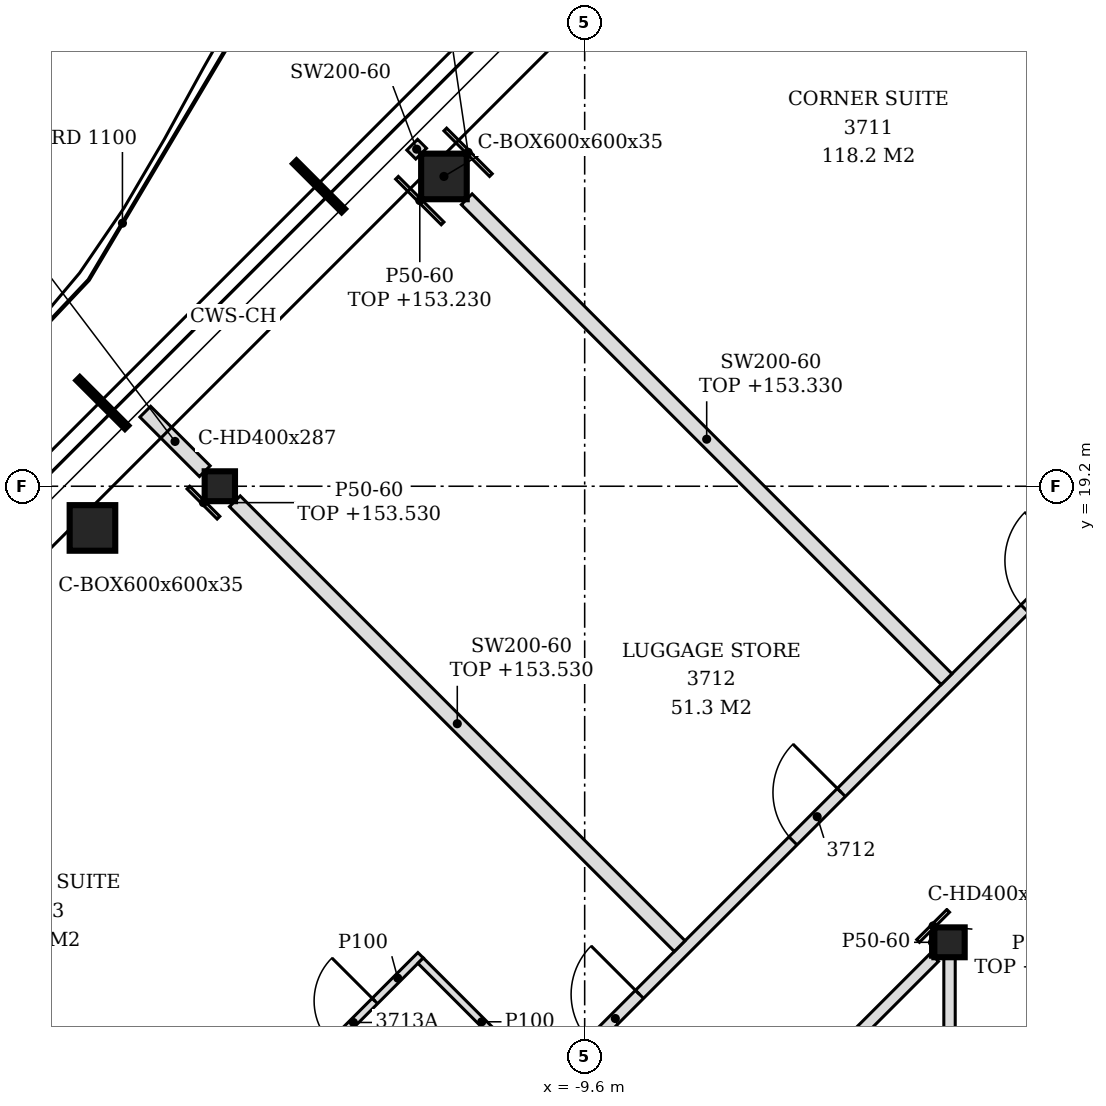
"""IFC4 building model, lengths in metres.
Left out: names, types, materials, properties, quantities, classifications, styles, units other than length and angle.
Written with IfcOpenShell. Run it as: python <this file> out.ifc"""

import sys

from ifc_helpers import new_model, si_unit, direction, frame, frame_2d, origin, origin_2d, place, context, subcontext, project, spatial, rectangle, hollow_rectangle, i_section, extrude, element, fill, save


model = new_model("IFC4")
c1 = context("Model", 3, precision=1e-05, world=origin(), true_north=direction((0.0, 1.0)))
c2 = subcontext(c1, "Body", "Model", "MODEL_VIEW")
j1 = project(units=[si_unit("LENGTHUNIT", "METRE"), si_unit("PLANEANGLEUNIT", "RADIAN")], contexts=[c1])
p1 = place(None, origin())
s1 = spatial("IfcSite", under=j1, at=p1, CompositionType="ELEMENT")
p2 = place(p1, origin())
s2 = spatial("IfcBuilding", under=s1, at=p2, CompositionType="ELEMENT")
p3 = place(p2, frame((0.0, 0.0, 150.6)))
s3 = spatial("IfcBuildingStorey", under=s2, at=p3, CompositionType="ELEMENT", Elevation=150.6)
for number, where, z_axis, x_axis in (
    (1, (-11.451, 23.276, -0.15), (0.0, 0.0, 1.0), (1.0, 0.0, 0.0)),
    (2, (-16.076, 18.652, -0.15), (0.0, 0.0, 1.0), (1.0, 0.0, 0.0)),
):
    element("IfcColumn", number, at=place(p3, frame(where, z_axis=z_axis, x_axis=x_axis)), inside=s3, PredefinedType="COLUMN", context=c2, shape_type="SweptSolid", body=[
        extrude(hollow_rectangle(XDim=0.6, YDim=0.6, WallThickness=0.035, at=origin_2d()), origin(), (0.0, 0.0, 1.0), 3.6),
    ])
for number, where, z_axis, x_axis in (
    (3, (-4.8, 13.2, -0.15), (0.0, 0.0, 1.0), (1.0, 0.0, 0.0)),
    (4, (-14.4, 19.2, -0.15), (0.0, 0.0, 1.0), (1.0, 0.0, 0.0)),
):
    element("IfcColumn", number, at=place(p3, frame(where, z_axis=z_axis, x_axis=x_axis)), inside=s3, PredefinedType="COLUMN", context=c2, shape_type="SweptSolid", body=[
        extrude(i_section(OverallWidth=0.399, OverallDepth=0.393, WebThickness=0.023, FlangeThickness=0.037, FilletRadius=0.015, at=origin_2d()), origin(), (0.0, 0.0, 1.0), 3.6),
    ])
p4 = place(p3, frame((-4.8, 2.596, 0.0), z_axis=(0.0, 0.0, 1.0), x_axis=(0.0, 1.0, 0.0)))
e5 = element("IfcWall", 5, at=p4, inside=s3, PredefinedType="PARTITIONING", context=c2, shape_type="SweptSolid", body=[
    extrude(rectangle(XDim=10.407, YDim=0.15, at=frame_2d((5.204, 0.0))), origin(), (0.0, 0.0, 1.0), 2.83),
])
p5 = place(p4, frame((2.954, 0.0, 0.0)))
e6 = element("IfcOpeningElement", 6, at=p5, cuts=e5, PredefinedType="OPENING", context=c2, shape_type="SweptSolid", body=[
    extrude(rectangle(XDim=0.9, YDim=2.1, at=frame_2d((0.45, 1.05))), frame((0.0, 0.085, 0.0), z_axis=(0.0, -1.0, 0.0), x_axis=(1.0, 0.0, 0.0)), (0.0, 0.0, 1.0), 0.17),
])
p6 = place(p3, frame((-9.675, 8.325, 0.0), z_axis=(0.0, 0.0, 1.0), x_axis=(0.707106781187, 0.707106781187, 0.0)))
e7 = element("IfcWall", 7, at=p6, inside=s3, PredefinedType="PARTITIONING", context=c2, shape_type="SweptSolid", body=[
    extrude(rectangle(XDim=6.614, YDim=0.15, at=frame_2d((3.307, 0.0))), origin(), (0.0, 0.0, 1.0), 2.93),
])
p7 = place(p3, frame((-12.075, 9.319, 0.0), z_axis=(0.0, 0.0, 1.0), x_axis=(0.707106781187, 0.707106781187, 0.0)))
e8 = element("IfcWall", 8, at=p7, inside=s3, PredefinedType="PARTITIONING", context=c2, shape_type="SweptSolid", body=[
    extrude(rectangle(XDim=13.793, YDim=0.15, at=frame_2d((6.896, 0.0))), origin(), (0.0, 0.0, 1.0), 2.73),
])
p8 = place(p7, frame((11.692, 0.0, 0.0)))
e9 = element("IfcOpeningElement", 9, at=p8, cuts=e8, PredefinedType="OPENING", context=c2, shape_type="SweptSolid", body=[
    extrude(rectangle(XDim=0.9, YDim=2.1, at=frame_2d((0.45, 1.05))), frame((0.0, 0.085, 0.0), z_axis=(0.0, -1.0, 0.0), x_axis=(1.0, 0.0, 0.0)), (0.0, 0.0, 1.0), 0.17),
])
p9 = place(p7, frame((7.376, 0.0, 0.0)))
e10 = element("IfcOpeningElement", 10, at=p9, cuts=e8, PredefinedType="OPENING", context=c2, shape_type="SweptSolid", body=[
    extrude(rectangle(XDim=0.9, YDim=2.1, at=frame_2d((0.45, 1.05))), frame((0.0, 0.085, 0.0), z_axis=(0.0, -1.0, 0.0), x_axis=(1.0, 0.0, 0.0)), (0.0, 0.0, 1.0), 0.17),
])
p10 = place(p7, frame((3.62, 0.0, 0.0)))
e11 = element("IfcOpeningElement", 11, at=p10, cuts=e8, PredefinedType="OPENING", context=c2, shape_type="SweptSolid", body=[
    extrude(rectangle(XDim=0.9, YDim=2.1, at=frame_2d((0.45, 1.05))), frame((0.0, 0.085, 0.0), z_axis=(0.0, -1.0, 0.0), x_axis=(1.0, 0.0, 0.0)), (0.0, 0.0, 1.0), 0.17),
])
p11 = place(p3, frame((-13.526, 11.262, 0.0), z_axis=(0.0, 0.0, 1.0), x_axis=(0.707106781187, 0.707106781187, 0.0)))
e12 = element("IfcWall", 12, at=p11, inside=s3, PredefinedType="PARTITIONING", context=c2, shape_type="SweptSolid", body=[
    extrude(rectangle(XDim=2.5, YDim=0.1, at=frame_2d((1.25, 0.0))), origin(), (0.0, 0.0, 1.0), 3.45),
])
p12 = place(p11, frame((0.85, 0.0, 0.0)))
e13 = element("IfcOpeningElement", 13, at=p12, cuts=e12, PredefinedType="OPENING", context=c2, shape_type="SweptSolid", body=[
    extrude(rectangle(XDim=0.8, YDim=2.1, at=frame_2d((0.4, 1.05))), frame((0.0, 0.06, 0.0), z_axis=(0.0, -1.0, 0.0), x_axis=(1.0, 0.0, 0.0)), (0.0, 0.0, 1.0), 0.12),
])
p13 = place(p3, frame((-10.15, 11.35, 0.0), z_axis=(0.0, 0.0, 1.0), x_axis=(-0.707160441348, 0.707053116953, 0.0)))
e14 = element("IfcWall", 14, at=p13, inside=s3, PredefinedType="PARTITIONING", context=c2, shape_type="SweptSolid", body=[
    extrude(rectangle(XDim=2.275, YDim=0.1, at=frame_2d((1.137, 0.0))), origin(), (0.0, 0.0, 1.0), 3.45),
])
p14 = place(p3, frame((-8.35, 13.15, 0.0), z_axis=(0.0, 0.0, 1.0), x_axis=(-0.707092030896, 0.707121531169, 0.0)))
e15 = element("IfcWall", 15, at=p14, inside=s3, PredefinedType="PARTITIONING", context=c2, shape_type="SweptSolid", body=[
    extrude(rectangle(XDim=8.276, YDim=0.2, at=frame_2d((4.138, 0.0))), origin(), (0.0, 0.0, 1.0), 2.93),
])
p15 = place(p3, frame((-4.838, 16.662, 0.0), z_axis=(0.0, 0.0, 1.0), x_axis=(-0.707120452615, 0.707093109494, 0.0)))
e16 = element("IfcWall", 16, at=p15, inside=s3, PredefinedType="PARTITIONING", context=c2, shape_type="SweptSolid", body=[
    extrude(rectangle(XDim=8.929, YDim=0.2, at=frame_2d((4.464, 0.0))), origin(), (0.0, 0.0, 1.0), 2.73),
])
p16 = place(p3, frame((-14.598, 19.398, 0.0), z_axis=(0.0, 0.0, 1.0), x_axis=(-0.707106781187, 0.707106781187, 0.0)))
e17 = element("IfcWall", 17, at=p16, inside=s3, PredefinedType="PARTITIONING", context=c2, shape_type="SweptSolid", body=[
    extrude(rectangle(XDim=1.107, YDim=0.2, at=frame_2d((0.554, 0.0))), origin(), (0.0, 0.0, 1.0), 2.63),
])
p17 = place(p3, frame((-11.752, 23.576, 0.0), z_axis=(0.0, 0.0, 1.0), x_axis=(-0.707106781187, 0.707106781187, 0.0)))
e18 = element("IfcWall", 18, at=p17, inside=s3, PredefinedType="PARTITIONING", context=c2, shape_type="SweptSolid", body=[
    extrude(rectangle(XDim=0.166, YDim=0.2, at=frame_2d((0.083, 0.0))), origin(), (0.0, 0.0, 1.0), 3.45),
])
p18 = place(p3, frame((-5.024, 13.003, 0.0), z_axis=(0.0, 0.0, 1.0), x_axis=(0.0, 1.0, 0.0)))
e19 = element("IfcWall", 19, at=p18, inside=s3, PredefinedType="PARTITIONING", context=c2, shape_type="SweptSolid", body=[
    extrude(rectangle(XDim=0.393, YDim=0.05, at=frame_2d((0.197, 0.0))), origin(), (0.0, 0.0, 1.0), 3.45),
])
p19 = place(p3, frame((-5.214, 13.218, 0.0), z_axis=(0.0, 0.0, 1.0), x_axis=(0.707106781187, 0.707106781187, 0.0)))
e20 = element("IfcWall", 20, at=p19, inside=s3, PredefinedType="PARTITIONING", context=c2, shape_type="SweptSolid", body=[
    extrude(rectangle(XDim=0.56, YDim=0.05, at=frame_2d((0.28, 0.0))), origin(), (0.0, 0.0, 1.0), 2.73),
])
p20 = place(p3, frame((-14.418, 18.786, 0.0), z_axis=(0.0, 0.0, 1.0), x_axis=(-0.707106781187, 0.707106781187, 0.0)))
e21 = element("IfcWall", 21, at=p20, inside=s3, PredefinedType="PARTITIONING", context=c2, shape_type="SweptSolid", body=[
    extrude(rectangle(XDim=0.56, YDim=0.05, at=frame_2d((0.28, 0.0))), origin(), (0.0, 0.0, 1.0), 2.93),
])
p21 = place(p3, frame((-11.469, 22.658, 0.0), z_axis=(0.0, 0.0, 1.0), x_axis=(-0.706962899457, 0.707250633645, 0.0)))
e22 = element("IfcWall", 22, at=p21, inside=s3, PredefinedType="PARTITIONING", context=c2, shape_type="SweptSolid", body=[
    extrude(rectangle(XDim=0.848, YDim=0.05, at=frame_2d((0.424, 0.0))), origin(), (0.0, 0.0, 1.0), 2.63),
])
p22 = place(p3, frame((-10.834, 23.293, 0.0), z_axis=(0.0, 0.0, 1.0), x_axis=(-0.707250633645, 0.706962899457, 0.0)))
e23 = element("IfcWall", 23, at=p22, inside=s3, PredefinedType="PARTITIONING", context=c2, shape_type="SweptSolid", body=[
    extrude(rectangle(XDim=0.848, YDim=0.05, at=frame_2d((0.424, 0.0))), origin(), (0.0, 0.0, 1.0), 2.93),
])
p23 = place(p8, origin())
e24 = element("IfcDoor", 24, at=p23, inside=s3, OperationType="SINGLE_SWING_RIGHT", PredefinedType="DOOR", context=c2, shape_type="SweptSolid", body=[
    extrude(rectangle(XDim=0.9, YDim=2.1, at=frame_2d((0.45, 1.05))), frame((0.0, 0.025, 0.0), z_axis=(0.0, -1.0, 0.0), x_axis=(1.0, 0.0, 0.0)), (0.0, 0.0, 1.0), 0.05),
])
fill(e9, e24)
p24 = place(p9, origin())
e25 = element("IfcDoor", 25, at=p24, inside=s3, OperationType="SINGLE_SWING_RIGHT", PredefinedType="DOOR", context=c2, shape_type="SweptSolid", body=[
    extrude(rectangle(XDim=0.9, YDim=2.1, at=frame_2d((0.45, 1.05))), frame((0.0, 0.025, 0.0), z_axis=(0.0, -1.0, 0.0), x_axis=(1.0, 0.0, 0.0)), (0.0, 0.0, 1.0), 0.05),
])
fill(e10, e25)
p25 = place(p10, origin())
e26 = element("IfcDoor", 26, at=p25, inside=s3, OperationType="SINGLE_SWING_RIGHT", PredefinedType="DOOR", context=c2, shape_type="SweptSolid", body=[
    extrude(rectangle(XDim=0.9, YDim=2.1, at=frame_2d((0.45, 1.05))), frame((0.0, 0.025, 0.0), z_axis=(0.0, -1.0, 0.0), x_axis=(1.0, 0.0, 0.0)), (0.0, 0.0, 1.0), 0.05),
])
fill(e11, e26)
p26 = place(p12, origin())
e27 = element("IfcDoor", 27, at=p26, inside=s3, OperationType="SINGLE_SWING_RIGHT", PredefinedType="DOOR", context=c2, shape_type="SweptSolid", body=[
    extrude(rectangle(XDim=0.8, YDim=2.1, at=frame_2d((0.4, 1.05))), frame((0.0, 0.025, 0.0), z_axis=(0.0, -1.0, 0.0), x_axis=(1.0, 0.0, 0.0)), (0.0, 0.0, 1.0), 0.05),
])
fill(e13, e27)
save(model, sys.argv[1])
